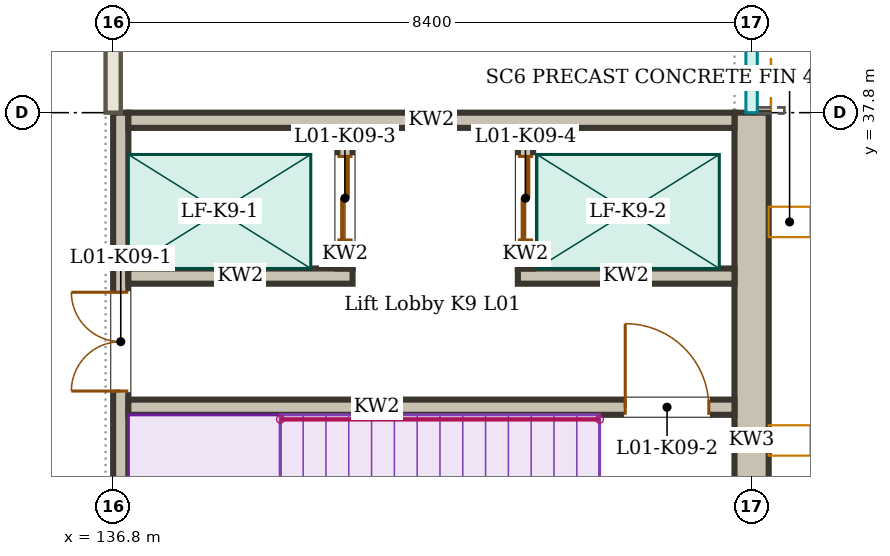
"""IFC4 building model, lengths in metres.
Left out: names, types, materials, properties, quantities, classifications, styles, units other than length and angle.
Written with IfcOpenShell. Run it as: python <this file> out.ifc"""

import sys

from ifc_helpers import new_model, si_unit, direction, frame, frame_2d, origin, place, context, subcontext, project, spatial, rectangle, extrude, element, fill, save


model = new_model("IFC4")
c1 = context("Model", 3, precision=1e-05, world=origin(), true_north=direction((0.0, 1.0)))
c2 = subcontext(c1, "Body", "Model", "MODEL_VIEW")
j1 = project(units=[si_unit("LENGTHUNIT", "METRE"), si_unit("PLANEANGLEUNIT", "RADIAN")], contexts=[c1])
p1 = place(None, origin())
s1 = spatial("IfcSite", under=j1, at=p1, CompositionType="ELEMENT")
p2 = place(p1, origin())
s2 = spatial("IfcBuilding", under=s1, at=p2, CompositionType="ELEMENT")
p3 = place(p2, frame((0.0, 0.0, 4.5)))
s3 = spatial("IfcBuildingStorey", under=s2, at=p3, CompositionType="ELEMENT", Elevation=4.5)
p4 = place(p3, frame((136.8, 37.8, 0.0), z_axis=(0.0, 0.0, 1.0), x_axis=(0.0, 1.0, 0.0)))
e1 = element("IfcWall", 1, at=p4, inside=s3, PredefinedType="PARTITIONING", context=c2, shape_type="SweptSolid", body=[
    extrude(rectangle(XDim=5.51, YDim=0.2, at=frame_2d((2.755, 0.0))), origin(), (0.0, 0.0, 1.0), 3.9),
])
p5 = place(p4, frame((2.3, 0.0, 0.0)))
e2 = element("IfcOpeningElement", 2, at=p5, cuts=e1, PredefinedType="OPENING", context=c2, shape_type="SweptSolid", body=[
    extrude(rectangle(XDim=1.0, YDim=2.1, at=frame_2d((0.5, 1.05))), frame((0.0, 0.11, 0.0), z_axis=(0.0, -1.0, 0.0), x_axis=(1.0, 0.0, 0.0)), (0.0, 0.0, 1.0), 0.22),
])
p6 = place(p3, frame((136.9, 29.625, 0.0), z_axis=(0.0, 0.0, 1.0), x_axis=(0.0, 1.0, 0.0)))
e3 = element("IfcWall", 3, at=p6, inside=s3, PredefinedType="SOLIDWALL", context=c2, shape_type="SweptSolid", body=[
    extrude(rectangle(XDim=8.175, YDim=0.2, at=frame_2d((4.087, 0.0))), origin(), (0.0, 0.0, 1.0), 4.5),
])
p7 = place(p6, frame((4.512, 0.0, 0.0)))
e4 = element("IfcOpeningElement", 4, at=p7, cuts=e3, PredefinedType="OPENING", context=c2, shape_type="SweptSolid", body=[
    extrude(rectangle(XDim=1.3, YDim=2.1, at=frame_2d((0.65, 1.05))), frame((0.0, 0.11, 0.0), z_axis=(0.0, -1.0, 0.0), x_axis=(1.0, 0.0, 0.0)), (0.0, 0.0, 1.0), 0.22),
])
p8 = place(p3, frame((145.2, 29.175, 0.0), z_axis=(0.0, 0.0, 1.0), x_axis=(0.0, 1.0, 0.0)))
e5 = element("IfcWall", 5, at=p8, inside=s3, PredefinedType="SOLIDWALL", context=c2, shape_type="SweptSolid", body=[
    extrude(rectangle(XDim=8.625, YDim=0.45, at=frame_2d((4.312, 0.0))), origin(), (0.0, 0.0, 1.0), 4.5),
])
p9 = place(p3, frame((137.0, 37.7, 0.0), z_axis=(0.0, 0.0, 1.0), x_axis=(1.0, 0.0, 0.0)))
e6 = element("IfcWall", 6, at=p9, inside=s3, PredefinedType="SOLIDWALL", context=c2, shape_type="SweptSolid", body=[
    extrude(rectangle(XDim=7.975, YDim=0.2, at=frame_2d((3.988, 0.0))), origin(), (0.0, 0.0, 1.0), 4.5),
])
p10 = place(p3, frame((137.0, 33.925, 0.0), z_axis=(0.0, 0.0, 1.0), x_axis=(1.0, 0.0, 0.0)))
e7 = element("IfcWall", 7, at=p10, inside=s3, PredefinedType="SOLIDWALL", context=c2, shape_type="SweptSolid", body=[
    extrude(rectangle(XDim=7.975, YDim=0.2, at=frame_2d((3.988, 0.0))), origin(), (0.0, 0.0, 1.0), 4.5),
])
p11 = place(p10, frame((6.538, 0.0, 0.0)))
e8 = element("IfcOpeningElement", 8, at=p11, cuts=e7, PredefinedType="OPENING", context=c2, shape_type="SweptSolid", body=[
    extrude(rectangle(XDim=1.1, YDim=2.1, at=frame_2d((0.55, 1.05))), frame((0.0, 0.11, 0.0), z_axis=(0.0, -1.0, 0.0), x_axis=(1.0, 0.0, 0.0)), (0.0, 0.0, 1.0), 0.22),
])
p12 = place(p3, frame((137.0, 35.65, 0.0), z_axis=(0.0, 0.0, 1.0), x_axis=(1.0, 0.0, 0.0)))
e9 = element("IfcWall", 9, at=p12, inside=s3, PredefinedType="SOLIDWALL", context=c2, shape_type="SweptSolid", body=[
    extrude(rectangle(XDim=2.95, YDim=0.2, at=frame_2d((1.475, 0.0))), origin(), (0.0, 0.0, 1.0), 4.5),
])
p13 = place(p3, frame((142.125, 35.65, 0.0), z_axis=(0.0, 0.0, 1.0), x_axis=(1.0, 0.0, 0.0)))
e10 = element("IfcWall", 10, at=p13, inside=s3, PredefinedType="SOLIDWALL", context=c2, shape_type="SweptSolid", body=[
    extrude(rectangle(XDim=2.85, YDim=0.2, at=frame_2d((1.425, 0.0))), origin(), (0.0, 0.0, 1.0), 4.5),
])
p14 = place(p3, frame((139.85, 35.75, 0.0), z_axis=(0.0, 0.0, 1.0), x_axis=(0.0, 1.0, 0.0)))
e11 = element("IfcWall", 11, at=p14, inside=s3, PredefinedType="SOLIDWALL", context=c2, shape_type="SweptSolid", body=[
    extrude(rectangle(XDim=1.85, YDim=0.2, at=frame_2d((0.925, 0.0))), origin(), (0.0, 0.0, 1.0), 4.5),
])
p15 = place(p14, frame((0.375, 0.0, 0.0)))
e12 = element("IfcOpeningElement", 12, at=p15, cuts=e11, PredefinedType="OPENING", context=c2, shape_type="SweptSolid", body=[
    extrude(rectangle(XDim=1.1, YDim=2.1, at=frame_2d((0.55, 1.05))), frame((0.0, 0.11, 0.0), z_axis=(0.0, -1.0, 0.0), x_axis=(1.0, 0.0, 0.0)), (0.0, 0.0, 1.0), 0.22),
])
p16 = place(p3, frame((142.225, 35.75, 0.0), z_axis=(0.0, 0.0, 1.0), x_axis=(0.0, 1.0, 0.0)))
e13 = element("IfcWall", 13, at=p16, inside=s3, PredefinedType="SOLIDWALL", context=c2, shape_type="SweptSolid", body=[
    extrude(rectangle(XDim=1.85, YDim=0.2, at=frame_2d((0.925, 0.0))), origin(), (0.0, 0.0, 1.0), 4.5),
])
p17 = place(p16, frame((0.375, 0.0, 0.0)))
e14 = element("IfcOpeningElement", 14, at=p17, cuts=e13, PredefinedType="OPENING", context=c2, shape_type="SweptSolid", body=[
    extrude(rectangle(XDim=1.1, YDim=2.1, at=frame_2d((0.55, 1.05))), frame((0.0, 0.11, 0.0), z_axis=(0.0, -1.0, 0.0), x_axis=(1.0, 0.0, 0.0)), (0.0, 0.0, 1.0), 0.22),
])
p18 = place(p7, origin())
e15 = element("IfcDoor", 15, at=p18, inside=s3, OperationType="DOUBLE_DOOR_DOUBLE_SWING", PredefinedType="DOOR", context=c2, shape_type="SweptSolid", body=[
    extrude(rectangle(XDim=1.3, YDim=2.1, at=frame_2d((0.65, 1.05))), frame((0.0, 0.025, 0.0), z_axis=(0.0, -1.0, 0.0), x_axis=(1.0, 0.0, 0.0)), (0.0, 0.0, 1.0), 0.05),
])
fill(e4, e15)
p19 = place(p11, origin())
e16 = element("IfcDoor", 16, at=p19, inside=s3, OperationType="SINGLE_SWING_LEFT", PredefinedType="DOOR", context=c2, shape_type="SweptSolid", body=[
    extrude(rectangle(XDim=1.1, YDim=2.1, at=frame_2d((0.55, 1.05))), frame((0.0, 0.025, 0.0), z_axis=(0.0, -1.0, 0.0), x_axis=(1.0, 0.0, 0.0)), (0.0, 0.0, 1.0), 0.05),
])
fill(e8, e16)
p20 = place(p15, origin())
e17 = element("IfcDoor", 17, at=p20, inside=s3, OperationType="DOUBLE_DOOR_SLIDING", PredefinedType="DOOR", context=c2, shape_type="SweptSolid", body=[
    extrude(rectangle(XDim=1.1, YDim=2.1, at=frame_2d((0.55, 1.05))), frame((0.0, 0.025, 0.0), z_axis=(0.0, -1.0, 0.0), x_axis=(1.0, 0.0, 0.0)), (0.0, 0.0, 1.0), 0.05),
])
fill(e12, e17)
p21 = place(p17, origin())
e18 = element("IfcDoor", 18, at=p21, inside=s3, OperationType="DOUBLE_DOOR_SLIDING", PredefinedType="DOOR", context=c2, shape_type="SweptSolid", body=[
    extrude(rectangle(XDim=1.1, YDim=2.1, at=frame_2d((0.55, 1.05))), frame((0.0, 0.025, 0.0), z_axis=(0.0, -1.0, 0.0), x_axis=(1.0, 0.0, 0.0)), (0.0, 0.0, 1.0), 0.05),
])
fill(e14, e18)
save(model, sys.argv[1])
